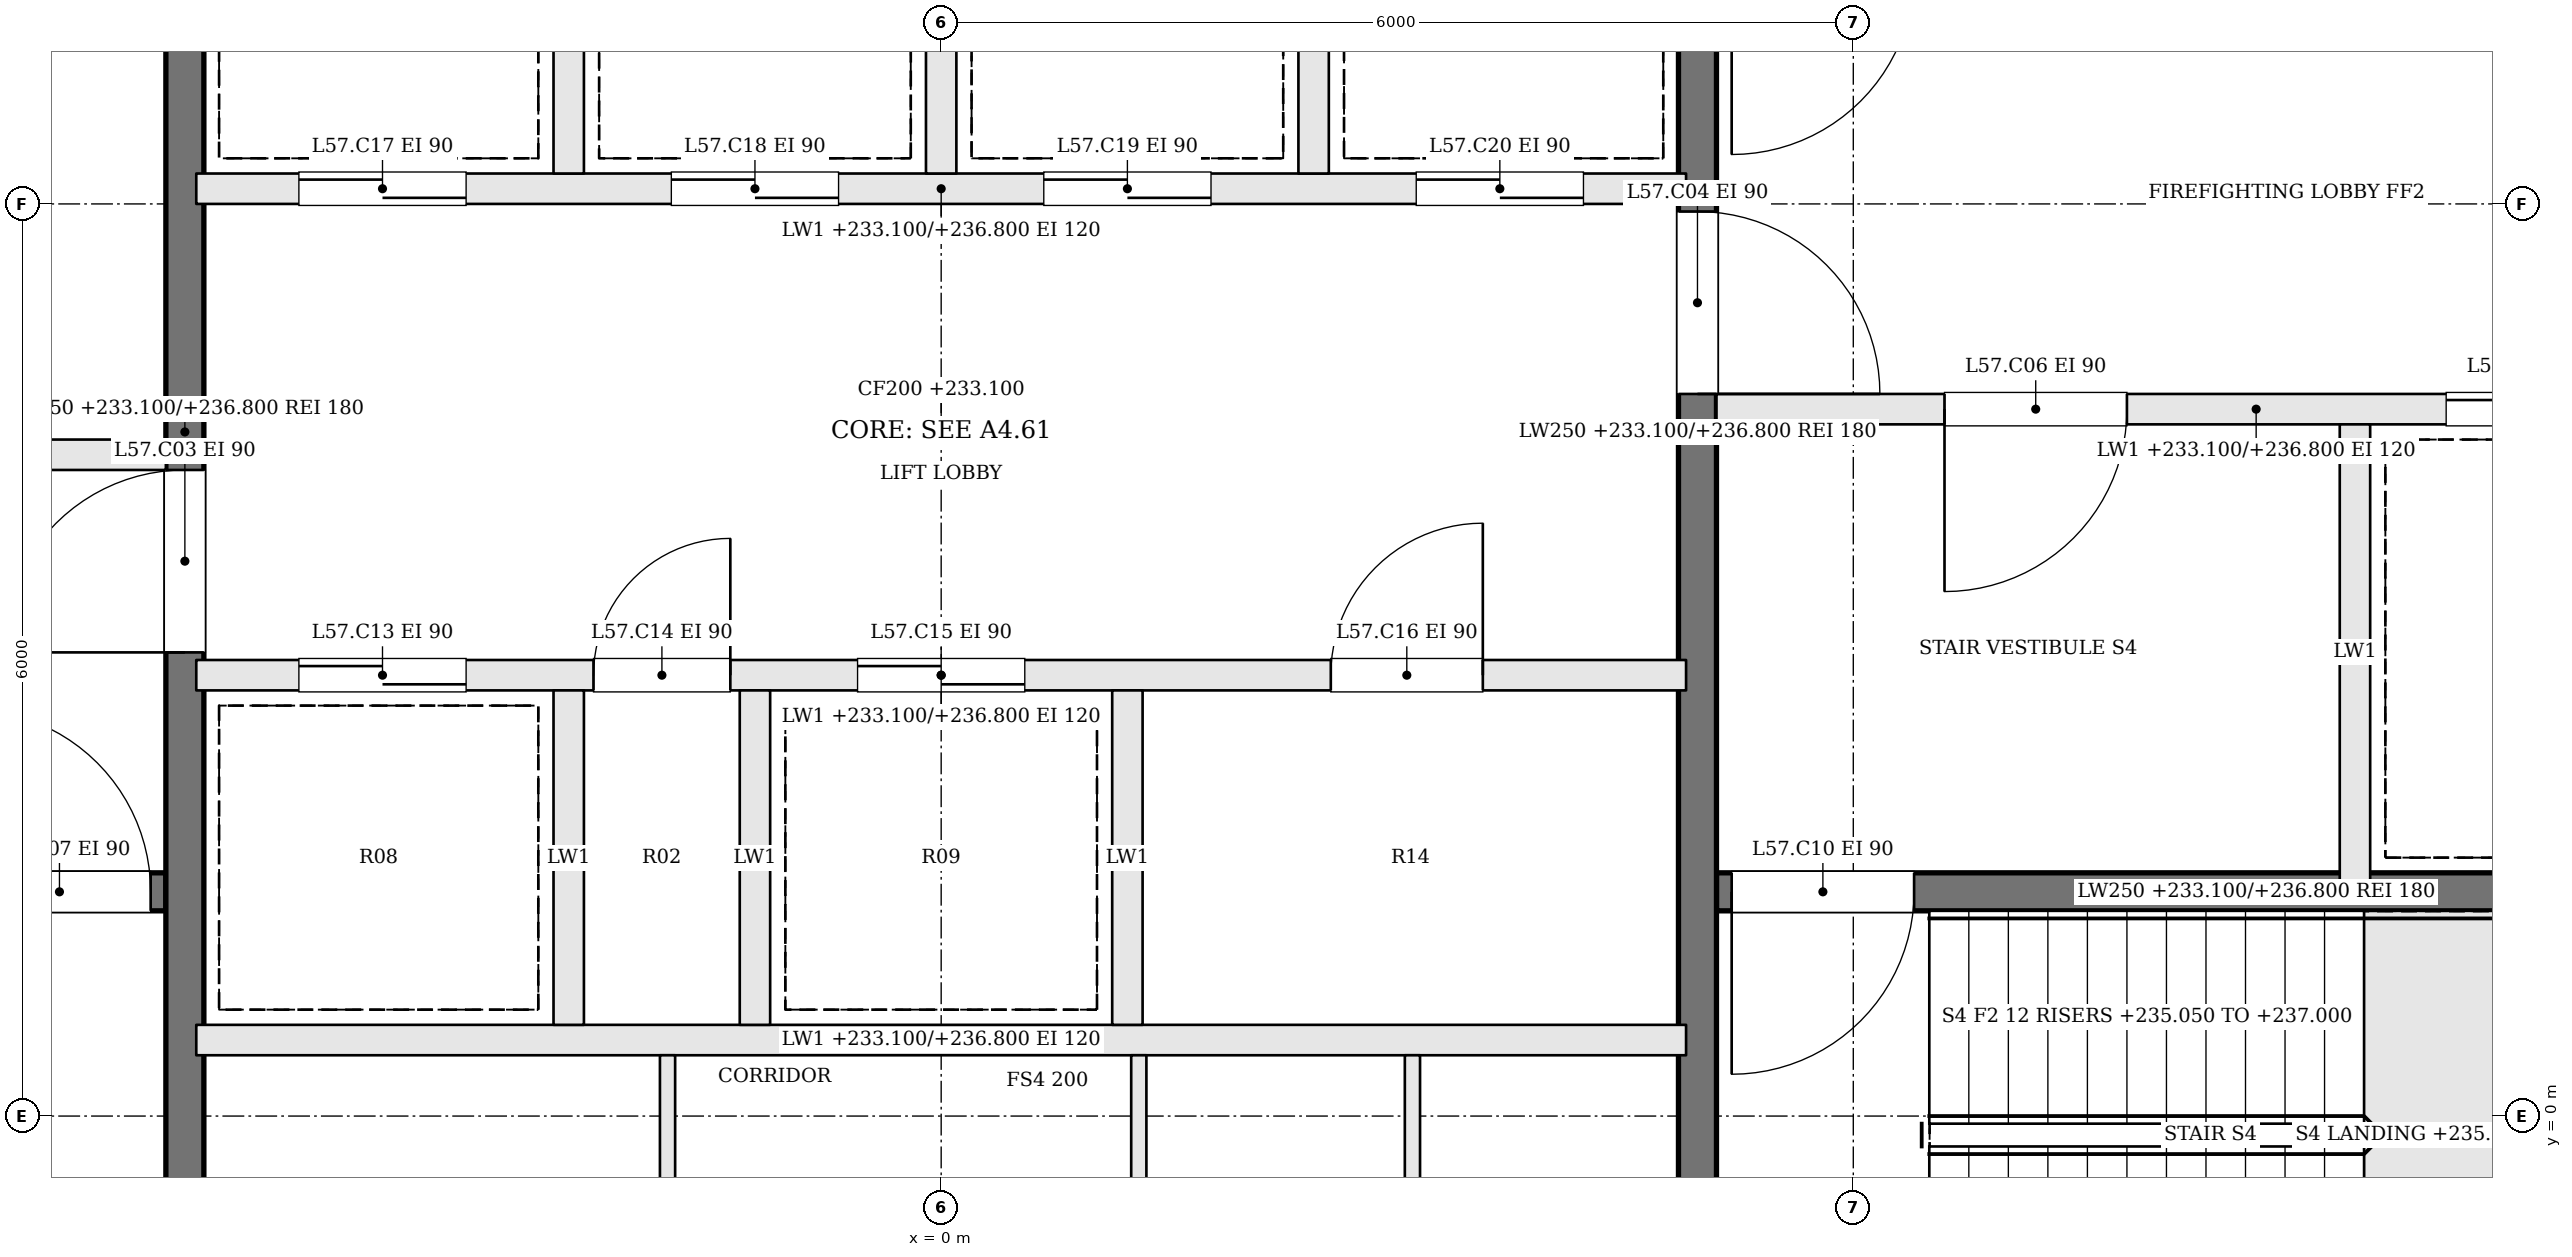
"""IFC4 building model, lengths in metres.
Left out: names, types, materials, properties, quantities, classifications, styles, units other than length and angle.
Written with IfcOpenShell. Run it as: python <this file> out.ifc"""

import sys

from ifc_helpers import new_model, si_unit, direction, frame, frame_2d, origin, place, context, subcontext, project, spatial, rectangle, extrude, element, fill, save


model = new_model("IFC4")
c1 = context("Model", 3, precision=1e-05, world=origin(), true_north=direction((0.0, 1.0)))
c2 = subcontext(c1, "Body", "Model", "MODEL_VIEW")
j1 = project(units=[si_unit("LENGTHUNIT", "METRE"), si_unit("PLANEANGLEUNIT", "RADIAN")], contexts=[c1])
p1 = place(None, origin())
s1 = spatial("IfcSite", under=j1, at=p1, CompositionType="ELEMENT")
p2 = place(p1, origin())
s2 = spatial("IfcBuilding", under=s1, at=p2, CompositionType="ELEMENT")
p3 = place(p2, frame((0.0, 0.0, 233.1)))
s3 = spatial("IfcBuildingStorey", under=s2, at=p3, CompositionType="ELEMENT", Elevation=233.1)
p4 = place(p3, frame((-12.2, 1.475, 0.0), z_axis=(0.0, 0.0, 1.0), x_axis=(1.0, 0.0, 0.0)))
e1 = element("IfcWall", 1, at=p4, inside=s3, PredefinedType="SOLIDWALL", context=c2, shape_type="SweptSolid", body=[
    extrude(rectangle(XDim=7.1, YDim=0.25, at=frame_2d((3.55, 0.0))), origin(), (0.0, 0.0, 1.0), 3.7),
])
p5 = place(p4, frame((5.8, 0.0, 0.0)))
e2 = element("IfcOpeningElement", 2, at=p5, cuts=e1, PredefinedType="OPENING", context=c2, shape_type="SweptSolid", body=[
    extrude(rectangle(XDim=1.2, YDim=2.1, at=frame_2d((0.6, 1.05))), frame((0.0, 0.135, 0.0), z_axis=(0.0, -1.0, 0.0), x_axis=(1.0, 0.0, 0.0)), (0.0, 0.0, 1.0), 0.27),
])
p6 = place(p3, frame((-12.2, 4.35, 0.0), z_axis=(0.0, 0.0, 1.0), x_axis=(1.0, 0.0, 0.0)))
e3 = element("IfcWall", 3, at=p6, inside=s3, PredefinedType="SOLIDWALL", context=c2, shape_type="SweptSolid", body=[
    extrude(rectangle(XDim=7.1, YDim=0.2, at=frame_2d((3.55, 0.0))), origin(), (0.0, 0.0, 1.0), 3.7),
])
p7 = place(p6, frame((4.4, 0.0, 0.0)))
e4 = element("IfcOpeningElement", 4, at=p7, cuts=e3, PredefinedType="OPENING", context=c2, shape_type="SweptSolid", body=[
    extrude(rectangle(XDim=1.2, YDim=2.1, at=frame_2d((0.6, 1.05))), frame((0.0, 0.11, 0.0), z_axis=(0.0, -1.0, 0.0), x_axis=(1.0, 0.0, 0.0)), (0.0, 0.0, 1.0), 0.22),
])
p8 = place(p6, frame((1.1, 0.0, 0.0)))
e5 = element("IfcOpeningElement", 5, at=p8, cuts=e3, PredefinedType="OPENING", context=c2, shape_type="SweptSolid", body=[
    extrude(rectangle(XDim=1.2, YDim=2.1, at=frame_2d((0.6, 1.05))), frame((0.0, 0.11, 0.0), z_axis=(0.0, -1.0, 0.0), x_axis=(1.0, 0.0, 0.0)), (0.0, 0.0, 1.0), 0.22),
])
p9 = place(p3, frame((12.2, 4.65, 0.0), z_axis=(0.0, 0.0, 1.0), x_axis=(-1.0, 0.0, 0.0)))
e6 = element("IfcWall", 6, at=p9, inside=s3, PredefinedType="SOLIDWALL", context=c2, shape_type="SweptSolid", body=[
    extrude(rectangle(XDim=7.1, YDim=0.2, at=frame_2d((3.55, 0.0))), origin(), (0.0, 0.0, 1.0), 3.7),
])
p10 = place(p9, frame((4.4, 0.0, 0.0)))
e7 = element("IfcOpeningElement", 7, at=p10, cuts=e6, PredefinedType="OPENING", context=c2, shape_type="SweptSolid", body=[
    extrude(rectangle(XDim=1.2, YDim=2.1, at=frame_2d((0.6, 1.05))), frame((0.0, 0.11, 0.0), z_axis=(0.0, -1.0, 0.0), x_axis=(1.0, 0.0, 0.0)), (0.0, 0.0, 1.0), 0.22),
])
p11 = place(p9, frame((1.1, 0.0, 0.0)))
e8 = element("IfcOpeningElement", 8, at=p11, cuts=e6, PredefinedType="OPENING", context=c2, shape_type="SweptSolid", body=[
    extrude(rectangle(XDim=1.2, YDim=2.1, at=frame_2d((0.6, 1.05))), frame((0.0, 0.11, 0.0), z_axis=(0.0, -1.0, 0.0), x_axis=(1.0, 0.0, 0.0)), (0.0, 0.0, 1.0), 0.22),
])
p12 = place(p3, frame((12.2, 1.475, 0.0), z_axis=(0.0, 0.0, 1.0), x_axis=(-1.0, 0.0, 0.0)))
e9 = element("IfcWall", 9, at=p12, inside=s3, PredefinedType="SOLIDWALL", context=c2, shape_type="SweptSolid", body=[
    extrude(rectangle(XDim=7.1, YDim=0.25, at=frame_2d((3.55, 0.0))), origin(), (0.0, 0.0, 1.0), 3.7),
])
p13 = place(p12, frame((5.8, 0.0, 0.0)))
e10 = element("IfcOpeningElement", 10, at=p13, cuts=e9, PredefinedType="OPENING", context=c2, shape_type="SweptSolid", body=[
    extrude(rectangle(XDim=1.2, YDim=2.1, at=frame_2d((0.6, 1.05))), frame((0.0, 0.135, 0.0), z_axis=(0.0, -1.0, 0.0), x_axis=(1.0, 0.0, 0.0)), (0.0, 0.0, 1.0), 0.27),
])
p14 = place(p3, frame((9.3, 4.55, 0.0), z_axis=(0.0, 0.0, 1.0), x_axis=(0.0, -1.0, 0.0)))
e11 = element("IfcWall", 11, at=p14, inside=s3, PredefinedType="SOLIDWALL", context=c2, shape_type="SweptSolid", body=[
    extrude(rectangle(XDim=3.0, YDim=0.2, at=frame_2d((1.5, 0.0))), origin(), (0.0, 0.0, 1.0), 3.7),
])
p15 = place(p3, frame((-4.975, -2.2, 0.0), z_axis=(0.0, 0.0, 1.0), x_axis=(0.0, 1.0, 0.0)))
e12 = element("IfcWall", 12, at=p15, inside=s3, PredefinedType="SOLIDWALL", context=c2, shape_type="SweptSolid", body=[
    extrude(rectangle(XDim=13.4, YDim=0.25, at=frame_2d((6.7, 0.0))), origin(), (0.0, 0.0, 1.0), 3.7),
])
p16 = place(p15, frame((5.25, 0.0, 0.0)))
e13 = element("IfcOpeningElement", 13, at=p16, cuts=e12, PredefinedType="OPENING", context=c2, shape_type="SweptSolid", body=[
    extrude(rectangle(XDim=1.2, YDim=2.1, at=frame_2d((0.6, 1.05))), frame((0.0, 0.135, 0.0), z_axis=(0.0, -1.0, 0.0), x_axis=(1.0, 0.0, 0.0)), (0.0, 0.0, 1.0), 0.27),
])
p17 = place(p3, frame((4.975, 11.2, 0.0), z_axis=(0.0, 0.0, 1.0), x_axis=(0.0, -1.0, 0.0)))
e14 = element("IfcWall", 14, at=p17, inside=s3, PredefinedType="SOLIDWALL", context=c2, shape_type="SweptSolid", body=[
    extrude(rectangle(XDim=13.4, YDim=0.25, at=frame_2d((6.7, 0.0))), origin(), (0.0, 0.0, 1.0), 3.7),
])
p18 = place(p17, frame((5.25, 0.0, 0.0)))
e15 = element("IfcOpeningElement", 15, at=p18, cuts=e14, PredefinedType="OPENING", context=c2, shape_type="SweptSolid", body=[
    extrude(rectangle(XDim=1.2, YDim=2.1, at=frame_2d((0.6, 1.05))), frame((0.0, 0.135, 0.0), z_axis=(0.0, -1.0, 0.0), x_axis=(1.0, 0.0, 0.0)), (0.0, 0.0, 1.0), 0.27),
])
p19 = place(p3, frame((-4.9, 0.5, 0.0), z_axis=(0.0, 0.0, 1.0), x_axis=(1.0, 0.0, 0.0)))
e16 = element("IfcWall", 16, at=p19, inside=s3, PredefinedType="SOLIDWALL", context=c2, shape_type="SweptSolid", body=[
    extrude(rectangle(XDim=9.8, YDim=0.2, at=frame_2d((4.9, 0.0))), origin(), (0.0, 0.0, 1.0), 3.7),
])
p20 = place(p3, frame((-4.9, 2.9, 0.0), z_axis=(0.0, 0.0, 1.0), x_axis=(1.0, 0.0, 0.0)))
e17 = element("IfcWall", 17, at=p20, inside=s3, PredefinedType="SOLIDWALL", context=c2, shape_type="SweptSolid", body=[
    extrude(rectangle(XDim=9.8, YDim=0.2, at=frame_2d((4.9, 0.0))), origin(), (0.0, 0.0, 1.0), 3.7),
])
p21 = place(p20, frame((0.675, 0.0, 0.0)))
e18 = element("IfcOpeningElement", 18, at=p21, cuts=e17, PredefinedType="OPENING", context=c2, shape_type="SweptSolid", body=[
    extrude(rectangle(XDim=1.1, YDim=2.1, at=frame_2d((0.55, 1.05))), frame((0.0, 0.11, 0.0), z_axis=(0.0, -1.0, 0.0), x_axis=(1.0, 0.0, 0.0)), (0.0, 0.0, 1.0), 0.22),
])
p22 = place(p20, frame((2.613, 0.0, 0.0)))
e19 = element("IfcOpeningElement", 19, at=p22, cuts=e17, PredefinedType="OPENING", context=c2, shape_type="SweptSolid", body=[
    extrude(rectangle(XDim=0.9, YDim=2.1, at=frame_2d((0.45, 1.05))), frame((0.0, 0.11, 0.0), z_axis=(0.0, -1.0, 0.0), x_axis=(1.0, 0.0, 0.0)), (0.0, 0.0, 1.0), 0.22),
])
p23 = place(p20, frame((4.35, 0.0, 0.0)))
e20 = element("IfcOpeningElement", 20, at=p23, cuts=e17, PredefinedType="OPENING", context=c2, shape_type="SweptSolid", body=[
    extrude(rectangle(XDim=1.1, YDim=2.1, at=frame_2d((0.55, 1.05))), frame((0.0, 0.11, 0.0), z_axis=(0.0, -1.0, 0.0), x_axis=(1.0, 0.0, 0.0)), (0.0, 0.0, 1.0), 0.22),
])
p24 = place(p20, frame((7.463, 0.0, 0.0)))
e21 = element("IfcOpeningElement", 21, at=p24, cuts=e17, PredefinedType="OPENING", context=c2, shape_type="SweptSolid", body=[
    extrude(rectangle(XDim=1.0, YDim=2.1, at=frame_2d((0.5, 1.05))), frame((0.0, 0.11, 0.0), z_axis=(0.0, -1.0, 0.0), x_axis=(1.0, 0.0, 0.0)), (0.0, 0.0, 1.0), 0.22),
])
p25 = place(p3, frame((-4.9, 6.1, 0.0), z_axis=(0.0, 0.0, 1.0), x_axis=(1.0, 0.0, 0.0)))
e22 = element("IfcWall", 22, at=p25, inside=s3, PredefinedType="SOLIDWALL", context=c2, shape_type="SweptSolid", body=[
    extrude(rectangle(XDim=9.8, YDim=0.2, at=frame_2d((4.9, 0.0))), origin(), (0.0, 0.0, 1.0), 3.7),
])
p26 = place(p25, frame((0.675, 0.0, 0.0)))
e23 = element("IfcOpeningElement", 23, at=p26, cuts=e22, PredefinedType="OPENING", context=c2, shape_type="SweptSolid", body=[
    extrude(rectangle(XDim=1.1, YDim=2.1, at=frame_2d((0.55, 1.05))), frame((0.0, 0.11, 0.0), z_axis=(0.0, -1.0, 0.0), x_axis=(1.0, 0.0, 0.0)), (0.0, 0.0, 1.0), 0.22),
])
p27 = place(p25, frame((3.125, 0.0, 0.0)))
e24 = element("IfcOpeningElement", 24, at=p27, cuts=e22, PredefinedType="OPENING", context=c2, shape_type="SweptSolid", body=[
    extrude(rectangle(XDim=1.1, YDim=2.1, at=frame_2d((0.55, 1.05))), frame((0.0, 0.11, 0.0), z_axis=(0.0, -1.0, 0.0), x_axis=(1.0, 0.0, 0.0)), (0.0, 0.0, 1.0), 0.22),
])
p28 = place(p25, frame((5.575, 0.0, 0.0)))
e25 = element("IfcOpeningElement", 25, at=p28, cuts=e22, PredefinedType="OPENING", context=c2, shape_type="SweptSolid", body=[
    extrude(rectangle(XDim=1.1, YDim=2.1, at=frame_2d((0.55, 1.05))), frame((0.0, 0.11, 0.0), z_axis=(0.0, -1.0, 0.0), x_axis=(1.0, 0.0, 0.0)), (0.0, 0.0, 1.0), 0.22),
])
p29 = place(p25, frame((8.025, 0.0, 0.0)))
e26 = element("IfcOpeningElement", 26, at=p29, cuts=e22, PredefinedType="OPENING", context=c2, shape_type="SweptSolid", body=[
    extrude(rectangle(XDim=1.1, YDim=2.1, at=frame_2d((0.55, 1.05))), frame((0.0, 0.11, 0.0), z_axis=(0.0, -1.0, 0.0), x_axis=(1.0, 0.0, 0.0)), (0.0, 0.0, 1.0), 0.22),
])
for number, where, z_axis, x_axis in (
    (27, (-2.45, 0.6, 0.0), (0.0, 0.0, 1.0), (0.0, 1.0, 0.0)),
    (28, (-1.225, 0.6, 0.0), (0.0, 0.0, 1.0), (0.0, 1.0, 0.0)),
    (29, (1.225, 0.6, 0.0), (0.0, 0.0, 1.0), (0.0, 1.0, 0.0)),
    (30, (-2.45, 6.2, 0.0), (0.0, 0.0, 1.0), (0.0, 1.0, 0.0)),
    (31, (0.0, 6.2, 0.0), (0.0, 0.0, 1.0), (0.0, 1.0, 0.0)),
    (32, (2.45, 6.2, 0.0), (0.0, 0.0, 1.0), (0.0, 1.0, 0.0)),
):
    element("IfcWall", number, at=place(p3, frame(where, z_axis=z_axis, x_axis=x_axis)), inside=s3, PredefinedType="SOLIDWALL", context=c2, shape_type="SweptSolid", body=[
        extrude(rectangle(XDim=2.2, YDim=0.2, at=frame_2d((1.1, 0.0))), origin(), (0.0, 0.0, 1.0), 3.7),
    ])
for number, where, z_axis, x_axis in (
    (33, (-1.8, -2.2, 0.0), (0.0, 0.0, 1.0), (0.0, 1.0, 0.0)),
    (34, (1.3, -2.2, 0.0), (0.0, 0.0, 1.0), (0.0, 1.0, 0.0)),
    (35, (3.1, -2.2, 0.0), (0.0, 0.0, 1.0), (0.0, 1.0, 0.0)),
):
    element("IfcWall", number, at=place(p3, frame(where, z_axis=z_axis, x_axis=x_axis)), inside=s3, PredefinedType="PARTITIONING", context=c2, shape_type="SweptSolid", body=[
        extrude(rectangle(XDim=2.6, YDim=0.1, at=frame_2d((1.3, 0.0))), origin(), (0.0, 0.0, 1.0), 3.7),
    ])
p30 = place(p16, origin())
e36 = element("IfcDoor", 36, at=p30, inside=s3, OperationType="SINGLE_SWING_LEFT", PredefinedType="DOOR", context=c2, shape_type="SweptSolid", body=[
    extrude(rectangle(XDim=1.2, YDim=2.1, at=frame_2d((0.6, 1.05))), frame((0.0, 0.025, 0.0), z_axis=(0.0, -1.0, 0.0), x_axis=(1.0, 0.0, 0.0)), (0.0, 0.0, 1.0), 0.05),
])
fill(e13, e36)
p31 = place(p18, origin())
e37 = element("IfcDoor", 37, at=p31, inside=s3, OperationType="SINGLE_SWING_RIGHT", PredefinedType="DOOR", context=c2, shape_type="SweptSolid", body=[
    extrude(rectangle(XDim=1.2, YDim=2.1, at=frame_2d((0.6, 1.05))), frame((0.0, 0.025, 0.0), z_axis=(0.0, -1.0, 0.0), x_axis=(1.0, 0.0, 0.0)), (0.0, 0.0, 1.0), 0.05),
])
fill(e15, e37)
p32 = place(p10, origin())
e38 = element("IfcDoor", 38, at=p32, inside=s3, OperationType="SINGLE_SWING_RIGHT", PredefinedType="DOOR", context=c2, shape_type="SweptSolid", body=[
    extrude(rectangle(XDim=1.2, YDim=2.1, at=frame_2d((0.6, 1.05))), frame((0.0, 0.025, 0.0), z_axis=(0.0, -1.0, 0.0), x_axis=(1.0, 0.0, 0.0)), (0.0, 0.0, 1.0), 0.05),
])
fill(e7, e38)
p33 = place(p5, origin())
e39 = element("IfcDoor", 39, at=p33, inside=s3, OperationType="SINGLE_SWING_LEFT", PredefinedType="DOOR", context=c2, shape_type="SweptSolid", body=[
    extrude(rectangle(XDim=1.2, YDim=2.1, at=frame_2d((0.6, 1.05))), frame((0.0, 0.025, 0.0), z_axis=(0.0, -1.0, 0.0), x_axis=(1.0, 0.0, 0.0)), (0.0, 0.0, 1.0), 0.05),
])
fill(e2, e39)
p34 = place(p13, origin())
e40 = element("IfcDoor", 40, at=p34, inside=s3, OperationType="SINGLE_SWING_RIGHT", PredefinedType="DOOR", context=c2, shape_type="SweptSolid", body=[
    extrude(rectangle(XDim=1.2, YDim=2.1, at=frame_2d((0.6, 1.05))), frame((0.0, 0.025, 0.0), z_axis=(0.0, -1.0, 0.0), x_axis=(1.0, 0.0, 0.0)), (0.0, 0.0, 1.0), 0.05),
])
fill(e10, e40)
p35 = place(p11, origin())
e41 = element("IfcDoor", 41, at=p35, inside=s3, OperationType="SLIDING_TO_RIGHT", PredefinedType="DOOR", context=c2, shape_type="SweptSolid", body=[
    extrude(rectangle(XDim=1.2, YDim=2.1, at=frame_2d((0.6, 1.05))), frame((0.0, 0.025, 0.0), z_axis=(0.0, -1.0, 0.0), x_axis=(1.0, 0.0, 0.0)), (0.0, 0.0, 1.0), 0.05),
])
fill(e8, e41)
p36 = place(p21, origin())
e42 = element("IfcDoor", 42, at=p36, inside=s3, OperationType="SLIDING_TO_RIGHT", PredefinedType="DOOR", context=c2, shape_type="SweptSolid", body=[
    extrude(rectangle(XDim=1.1, YDim=2.1, at=frame_2d((0.55, 1.05))), frame((0.0, 0.025, 0.0), z_axis=(0.0, -1.0, 0.0), x_axis=(1.0, 0.0, 0.0)), (0.0, 0.0, 1.0), 0.05),
])
fill(e18, e42)
p37 = place(p22, origin())
e43 = element("IfcDoor", 43, at=p37, inside=s3, OperationType="SINGLE_SWING_RIGHT", PredefinedType="DOOR", context=c2, shape_type="SweptSolid", body=[
    extrude(rectangle(XDim=0.9, YDim=2.1, at=frame_2d((0.45, 1.05))), frame((0.0, 0.025, 0.0), z_axis=(0.0, -1.0, 0.0), x_axis=(1.0, 0.0, 0.0)), (0.0, 0.0, 1.0), 0.05),
])
fill(e19, e43)
p38 = place(p23, origin())
e44 = element("IfcDoor", 44, at=p38, inside=s3, OperationType="SLIDING_TO_LEFT", PredefinedType="DOOR", context=c2, shape_type="SweptSolid", body=[
    extrude(rectangle(XDim=1.1, YDim=2.1, at=frame_2d((0.55, 1.05))), frame((0.0, 0.025, 0.0), z_axis=(0.0, -1.0, 0.0), x_axis=(1.0, 0.0, 0.0)), (0.0, 0.0, 1.0), 0.05),
])
fill(e20, e44)
p39 = place(p24, origin())
e45 = element("IfcDoor", 45, at=p39, inside=s3, OperationType="SINGLE_SWING_RIGHT", PredefinedType="DOOR", context=c2, shape_type="SweptSolid", body=[
    extrude(rectangle(XDim=1.0, YDim=2.1, at=frame_2d((0.5, 1.05))), frame((0.0, 0.025, 0.0), z_axis=(0.0, -1.0, 0.0), x_axis=(1.0, 0.0, 0.0)), (0.0, 0.0, 1.0), 0.05),
])
fill(e21, e45)
p40 = place(p26, origin())
e46 = element("IfcDoor", 46, at=p40, inside=s3, OperationType="SLIDING_TO_RIGHT", PredefinedType="DOOR", context=c2, shape_type="SweptSolid", body=[
    extrude(rectangle(XDim=1.1, YDim=2.1, at=frame_2d((0.55, 1.05))), frame((0.0, 0.025, 0.0), z_axis=(0.0, -1.0, 0.0), x_axis=(1.0, 0.0, 0.0)), (0.0, 0.0, 1.0), 0.05),
])
fill(e23, e46)
p41 = place(p27, origin())
e47 = element("IfcDoor", 47, at=p41, inside=s3, OperationType="SLIDING_TO_LEFT", PredefinedType="DOOR", context=c2, shape_type="SweptSolid", body=[
    extrude(rectangle(XDim=1.1, YDim=2.1, at=frame_2d((0.55, 1.05))), frame((0.0, 0.025, 0.0), z_axis=(0.0, -1.0, 0.0), x_axis=(1.0, 0.0, 0.0)), (0.0, 0.0, 1.0), 0.05),
])
fill(e24, e47)
p42 = place(p28, origin())
e48 = element("IfcDoor", 48, at=p42, inside=s3, OperationType="SLIDING_TO_RIGHT", PredefinedType="DOOR", context=c2, shape_type="SweptSolid", body=[
    extrude(rectangle(XDim=1.1, YDim=2.1, at=frame_2d((0.55, 1.05))), frame((0.0, 0.025, 0.0), z_axis=(0.0, -1.0, 0.0), x_axis=(1.0, 0.0, 0.0)), (0.0, 0.0, 1.0), 0.05),
])
fill(e25, e48)
p43 = place(p29, origin())
e49 = element("IfcDoor", 49, at=p43, inside=s3, OperationType="SLIDING_TO_LEFT", PredefinedType="DOOR", context=c2, shape_type="SweptSolid", body=[
    extrude(rectangle(XDim=1.1, YDim=2.1, at=frame_2d((0.55, 1.05))), frame((0.0, 0.025, 0.0), z_axis=(0.0, -1.0, 0.0), x_axis=(1.0, 0.0, 0.0)), (0.0, 0.0, 1.0), 0.05),
])
fill(e26, e49)
save(model, sys.argv[1])
